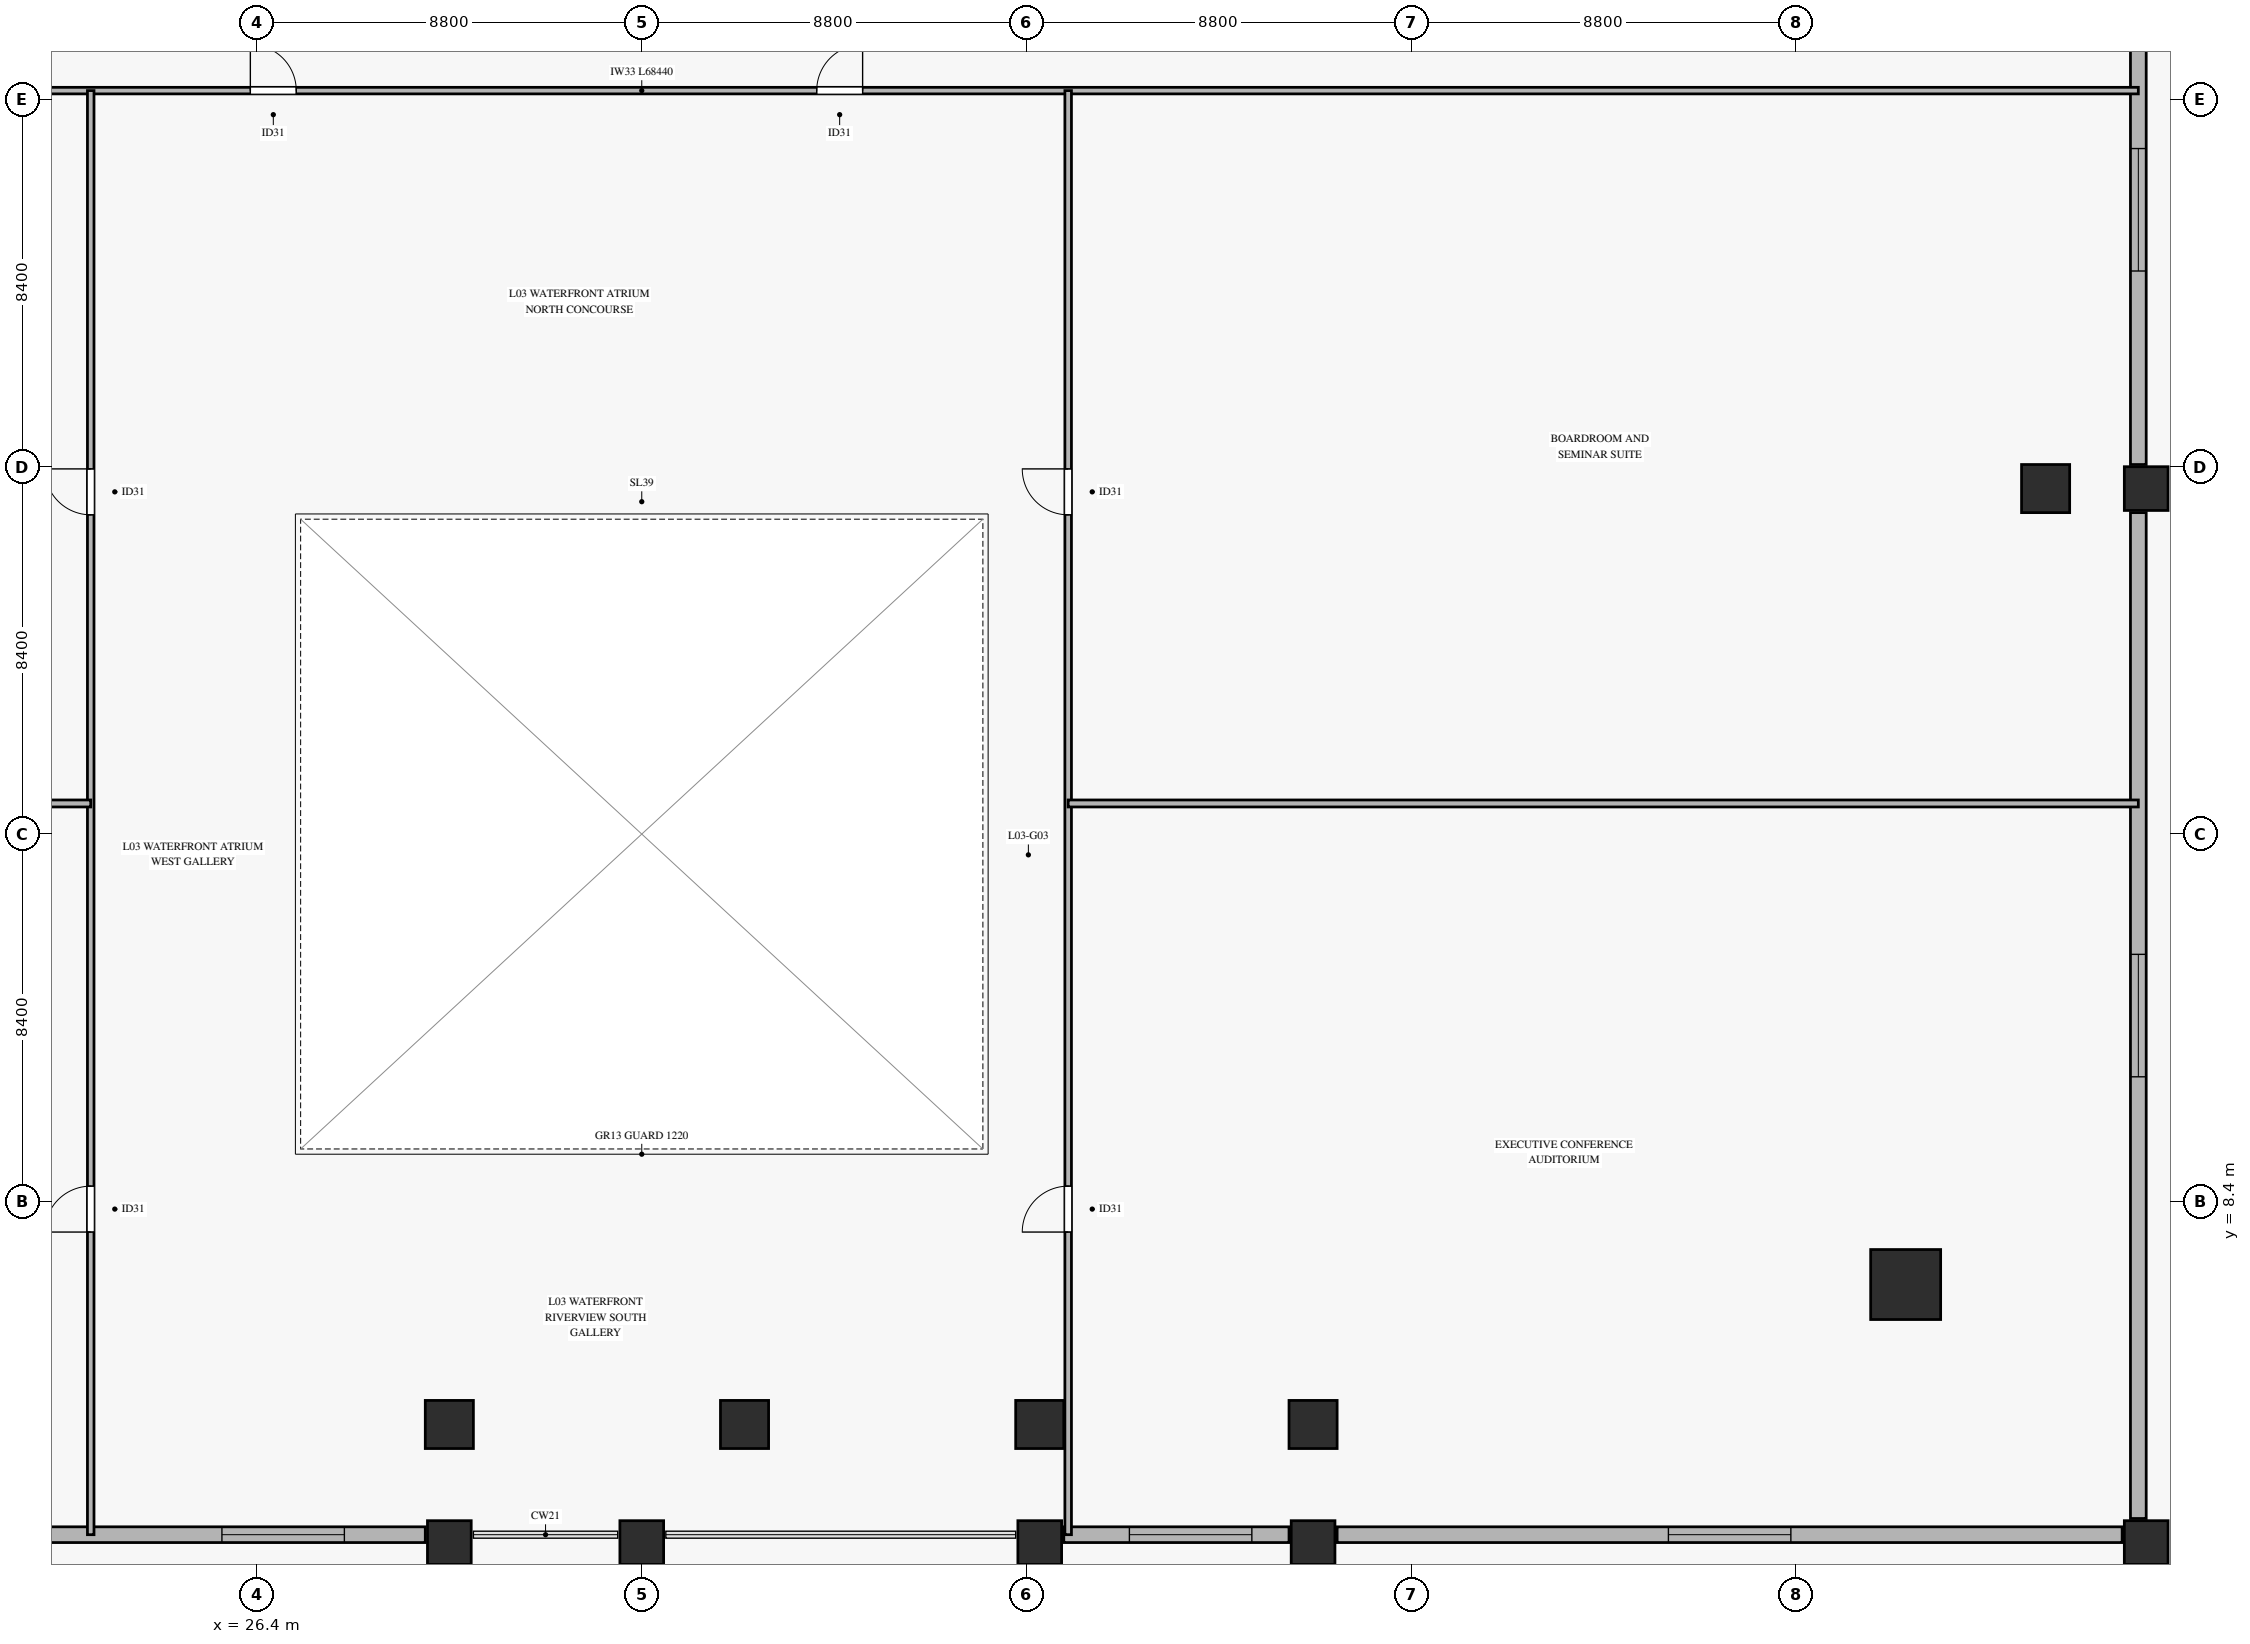
"""IFC4 building model, lengths in metres.
Left out: names, types, materials, properties, quantities, classifications, styles, units other than length and angle.
Written with IfcOpenShell. Run it as: python <this file> out.ifc"""

import sys

from ifc_helpers import new_model, si_unit, direction, frame, frame_2d, origin, origin_2d, place, context, subcontext, project, spatial, rectangle, hollow_rectangle, extrude, source, transform, mapped, element, fill, save


model = new_model("IFC4")
c1 = context("Model", 3, precision=1e-05, world=origin(), true_north=direction((0.0, 1.0)))
c2 = subcontext(c1, "Body", "Model", "MODEL_VIEW")
j1 = project(units=[si_unit("LENGTHUNIT", "METRE"), si_unit("PLANEANGLEUNIT", "RADIAN")], contexts=[c1])
p1 = place(None, origin())
s1 = spatial("IfcSite", under=j1, at=p1, CompositionType="ELEMENT")
p2 = place(p1, origin())
s2 = spatial("IfcBuilding", under=s1, at=p2, CompositionType="ELEMENT")
p3 = place(p2, frame((0.0, 0.0, 10.4)))
s3 = spatial("IfcBuildingStorey", under=s2, at=p3, CompositionType="ELEMENT", Elevation=10.4)
m1 = source(origin(), c2, "Body", "SweptSolid", [
    extrude(hollow_rectangle(XDim=1.6, YDim=1.6, WallThickness=0.075, at=origin_2d()), origin(), (0.0, 0.0, 1.0), 4.54),
])
p4 = place(p3, frame((64.1, 6.5, 0.0), z_axis=(0.0, 0.0, 1.0), x_axis=(1.0, 0.0, 0.0)))
e1 = element("IfcColumn", 1, at=p4, inside=s3, PredefinedType="COLUMN", context=c2, shape_type="MappedRepresentation", body=[
    mapped(m1, transform((0.0, 0.0, 0.0), x_axis=(1.0, 0.0, 0.0), y_axis=(0.0, 1.0, 0.0), z_axis=(0.0, 0.0, 1.0), scale=1.0)),
])
m2 = source(origin(), c2, "Body", "SweptSolid", [
    extrude(hollow_rectangle(XDim=1.1, YDim=1.1, WallThickness=0.05, at=origin_2d()), origin(), (0.0, 0.0, 1.0), 4.54),
])
for number, where, z_axis, x_axis in (
    (2, (30.8, 3.3, 0.0), (0.0, 0.0, 1.0), (1.0, 0.0, 0.0)),
    (3, (37.55, 3.3, 0.0), (0.0, 0.0, 1.0), (1.0, 0.0, 0.0)),
    (4, (44.3, 3.3, 0.0), (0.0, 0.0, 1.0), (1.0, 0.0, 0.0)),
    (5, (50.55, 3.3, 0.0), (0.0, 0.0, 1.0), (1.0, 0.0, 0.0)),
    (6, (67.3, 24.7, 0.0), (0.0, 0.0, 1.0), (1.0, 0.0, 0.0)),
):
    element("IfcColumn", number, at=place(p3, frame(where, z_axis=z_axis, x_axis=x_axis)), inside=s3, PredefinedType="COLUMN", context=c2, shape_type="MappedRepresentation", body=[
        mapped(m2, transform((0.0, 0.0, 0.0), x_axis=(1.0, 0.0, 0.0), y_axis=(0.0, 1.0, 0.0), z_axis=(0.0, 0.0, 1.0), scale=1.0)),
    ])
m3 = source(origin(), c2, "Body", "SweptSolid", [
    extrude(hollow_rectangle(XDim=1.0, YDim=1.0, WallThickness=0.045, at=origin_2d()), origin(), (0.0, 0.0, 1.0), 4.54),
])
for number, where, z_axis, x_axis in (
    (7, (30.8, 0.6, 0.0), (0.0, 0.0, 1.0), (1.0, 0.0, 0.0)),
    (8, (35.2, 0.6, 0.0), (0.0, 0.0, 1.0), (1.0, 0.0, 0.0)),
    (9, (44.3, 0.6, 0.0), (0.0, 0.0, 1.0), (1.0, 0.0, 0.0)),
    (10, (50.55, 0.6, 0.0), (0.0, 0.0, 1.0), (1.0, 0.0, 0.0)),
    (11, (69.6, 0.6, 0.0), (0.0, 0.0, 1.0), (1.0, 0.0, 0.0)),
    (12, (69.6, 24.7, 0.0), (0.0, 0.0, 1.0), (1.0, 0.0, 0.0)),
):
    element("IfcColumn", number, at=place(p3, frame(where, z_axis=z_axis, x_axis=x_axis)), inside=s3, PredefinedType="COLUMN", context=c2, shape_type="MappedRepresentation", body=[
        mapped(m3, transform((0.0, 0.0, 0.0), x_axis=(1.0, 0.0, 0.0), y_axis=(0.0, 1.0, 0.0), z_axis=(0.0, 0.0, 1.0), scale=1.0)),
    ])
p5 = place(p3, frame((20.4, 0.78, 0.0), z_axis=(0.0, 0.0, 1.0), x_axis=(1.0, 0.0, 0.0)))
e13 = element("IfcWall", 13, at=p5, inside=s3, PredefinedType="SOLIDWALL", context=c2, shape_type="SweptSolid", body=[
    extrude(rectangle(XDim=9.85, YDim=0.36, at=frame_2d((4.925, 0.0))), origin(), (0.0, 0.0, 1.0), 3.42),
])
p6 = place(p5, frame((5.2, 0.0, 0.72)))
e14 = element("IfcOpeningElement", 14, at=p6, cuts=e13, PredefinedType="OPENING", context=c2, shape_type="SweptSolid", body=[
    extrude(rectangle(XDim=2.8, YDim=2.0, at=frame_2d((1.4, 1.0))), frame((0.0, 0.19, 0.0), z_axis=(0.0, -1.0, 0.0), x_axis=(1.0, 0.0, 0.0)), (0.0, 0.0, 1.0), 0.38),
])
p7 = place(p3, frame((44.85, 0.78, 0.0), z_axis=(0.0, 0.0, 1.0), x_axis=(1.0, 0.0, 0.0)))
e15 = element("IfcWall", 15, at=p7, inside=s3, PredefinedType="SOLIDWALL", context=c2, shape_type="SweptSolid", body=[
    extrude(rectangle(XDim=5.15, YDim=0.36, at=frame_2d((2.575, 0.0))), origin(), (0.0, 0.0, 1.0), 3.42),
])
p8 = place(p7, frame((1.5, 0.0, 0.72)))
e16 = element("IfcOpeningElement", 16, at=p8, cuts=e15, PredefinedType="OPENING", context=c2, shape_type="SweptSolid", body=[
    extrude(rectangle(XDim=2.8, YDim=2.0, at=frame_2d((1.4, 1.0))), frame((0.0, 0.19, 0.0), z_axis=(0.0, -1.0, 0.0), x_axis=(1.0, 0.0, 0.0)), (0.0, 0.0, 1.0), 0.38),
])
p9 = place(p3, frame((51.1, 0.78, 0.0), z_axis=(0.0, 0.0, 1.0), x_axis=(1.0, 0.0, 0.0)))
e17 = element("IfcWall", 17, at=p9, inside=s3, PredefinedType="SOLIDWALL", context=c2, shape_type="SweptSolid", body=[
    extrude(rectangle(XDim=17.95, YDim=0.36, at=frame_2d((8.975, 0.0))), origin(), (0.0, 0.0, 1.0), 3.42),
])
p10 = place(p9, frame((7.575, 0.0, 0.72)))
e18 = element("IfcOpeningElement", 18, at=p10, cuts=e17, PredefinedType="OPENING", context=c2, shape_type="SweptSolid", body=[
    extrude(rectangle(XDim=2.8, YDim=2.0, at=frame_2d((1.4, 1.0))), frame((0.0, 0.19, 0.0), z_axis=(0.0, -1.0, 0.0), x_axis=(1.0, 0.0, 0.0)), (0.0, 0.0, 1.0), 0.38),
])
p11 = place(p3, frame((69.42, 1.15, 0.0), z_axis=(0.0, 0.0, 1.0), x_axis=(0.0, 1.0, 0.0)))
e19 = element("IfcWall", 19, at=p11, inside=s3, PredefinedType="SOLIDWALL", context=c2, shape_type="SweptSolid", body=[
    extrude(rectangle(XDim=23.0, YDim=0.36, at=frame_2d((11.5, 0.0))), origin(), (0.0, 0.0, 1.0), 3.42),
])
p12 = place(p11, frame((10.1, 0.0, 0.72)))
e20 = element("IfcOpeningElement", 20, at=p12, cuts=e19, PredefinedType="OPENING", context=c2, shape_type="SweptSolid", body=[
    extrude(rectangle(XDim=2.8, YDim=2.0, at=frame_2d((1.4, 1.0))), frame((0.0, 0.19, 0.0), z_axis=(0.0, -1.0, 0.0), x_axis=(1.0, 0.0, 0.0)), (0.0, 0.0, 1.0), 0.38),
])
p13 = place(p3, frame((69.42, 25.25, 0.0), z_axis=(0.0, 0.0, 1.0), x_axis=(0.0, 1.0, 0.0)))
e21 = element("IfcWall", 21, at=p13, inside=s3, PredefinedType="SOLIDWALL", context=c2, shape_type="SweptSolid", body=[
    extrude(rectangle(XDim=11.65, YDim=0.36, at=frame_2d((5.825, 0.0))), origin(), (0.0, 0.0, 1.0), 3.42),
])
p14 = place(p13, frame((4.425, 0.0, 0.72)))
e22 = element("IfcOpeningElement", 22, at=p14, cuts=e21, PredefinedType="OPENING", context=c2, shape_type="SweptSolid", body=[
    extrude(rectangle(XDim=2.8, YDim=2.0, at=frame_2d((1.4, 1.0))), frame((0.0, 0.19, 0.0), z_axis=(0.0, -1.0, 0.0), x_axis=(1.0, 0.0, 0.0)), (0.0, 0.0, 1.0), 0.38),
])
p15 = place(p3, frame((0.98, 33.8, 0.0), z_axis=(0.0, 0.0, 1.0), x_axis=(1.0, 0.0, 0.0)))
e23 = element("IfcWall", 23, at=p15, inside=s3, PredefinedType="PARTITIONING", context=c2, shape_type="SweptSolid", body=[
    extrude(rectangle(XDim=68.44, YDim=0.15, at=frame_2d((34.22, 0.0))), origin(), (0.0, 0.0, 1.0), 3.425),
])
p16 = place(p15, frame((25.27, 0.0, 0.0)))
e24 = element("IfcOpeningElement", 24, at=p16, cuts=e23, PredefinedType="OPENING", context=c2, shape_type="SweptSolid", body=[
    extrude(rectangle(XDim=1.05, YDim=2.15, at=frame_2d((0.525, 1.075))), frame((0.0, 0.085, 0.0), z_axis=(0.0, -1.0, 0.0), x_axis=(1.0, 0.0, 0.0)), (0.0, 0.0, 1.0), 0.17),
])
p17 = place(p15, frame((38.22, 0.0, 0.0)))
e25 = element("IfcOpeningElement", 25, at=p17, cuts=e23, PredefinedType="OPENING", context=c2, shape_type="SweptSolid", body=[
    extrude(rectangle(XDim=1.05, YDim=2.15, at=frame_2d((0.525, 1.075))), frame((0.0, 0.085, 0.0), z_axis=(0.0, -1.0, 0.0), x_axis=(1.0, 0.0, 0.0)), (0.0, 0.0, 1.0), 0.17),
])
p18 = place(p3, frame((22.6, 0.78, 0.0), z_axis=(0.0, 0.0, 1.0), x_axis=(0.0, 1.0, 0.0)))
e26 = element("IfcWall", 26, at=p18, inside=s3, PredefinedType="PARTITIONING", context=c2, shape_type="SweptSolid", body=[
    extrude(rectangle(XDim=33.02, YDim=0.15, at=frame_2d((16.51, 0.0))), origin(), (0.0, 0.0, 1.0), 3.425),
])
p19 = place(p18, frame((6.92, 0.0, 0.0)))
e27 = element("IfcOpeningElement", 27, at=p19, cuts=e26, PredefinedType="OPENING", context=c2, shape_type="SweptSolid", body=[
    extrude(rectangle(XDim=1.05, YDim=2.15, at=frame_2d((0.525, 1.075))), frame((0.0, 0.085, 0.0), z_axis=(0.0, -1.0, 0.0), x_axis=(1.0, 0.0, 0.0)), (0.0, 0.0, 1.0), 0.17),
])
p20 = place(p18, frame((23.32, 0.0, 0.0)))
e28 = element("IfcOpeningElement", 28, at=p20, cuts=e26, PredefinedType="OPENING", context=c2, shape_type="SweptSolid", body=[
    extrude(rectangle(XDim=1.05, YDim=2.15, at=frame_2d((0.525, 1.075))), frame((0.0, 0.085, 0.0), z_axis=(0.0, -1.0, 0.0), x_axis=(1.0, 0.0, 0.0)), (0.0, 0.0, 1.0), 0.17),
])
p21 = place(p3, frame((44.95, 0.78, 0.0), z_axis=(0.0, 0.0, 1.0), x_axis=(0.0, 1.0, 0.0)))
e29 = element("IfcWall", 29, at=p21, inside=s3, PredefinedType="PARTITIONING", context=c2, shape_type="SweptSolid", body=[
    extrude(rectangle(XDim=33.02, YDim=0.15, at=frame_2d((16.51, 0.0))), origin(), (0.0, 0.0, 1.0), 3.425),
])
p22 = place(p21, frame((6.92, 0.0, 0.0)))
e30 = element("IfcOpeningElement", 30, at=p22, cuts=e29, PredefinedType="OPENING", context=c2, shape_type="SweptSolid", body=[
    extrude(rectangle(XDim=1.05, YDim=2.15, at=frame_2d((0.525, 1.075))), frame((0.0, 0.085, 0.0), z_axis=(0.0, -1.0, 0.0), x_axis=(1.0, 0.0, 0.0)), (0.0, 0.0, 1.0), 0.17),
])
p23 = place(p21, frame((23.32, 0.0, 0.0)))
e31 = element("IfcOpeningElement", 31, at=p23, cuts=e29, PredefinedType="OPENING", context=c2, shape_type="SweptSolid", body=[
    extrude(rectangle(XDim=1.05, YDim=2.15, at=frame_2d((0.525, 1.075))), frame((0.0, 0.085, 0.0), z_axis=(0.0, -1.0, 0.0), x_axis=(1.0, 0.0, 0.0)), (0.0, 0.0, 1.0), 0.17),
])
p24 = place(p3, frame((0.98, 17.5, 0.0), z_axis=(0.0, 0.0, 1.0), x_axis=(1.0, 0.0, 0.0)))
e32 = element("IfcWall", 32, at=p24, inside=s3, PredefinedType="PARTITIONING", context=c2, shape_type="SweptSolid", body=[
    extrude(rectangle(XDim=21.62, YDim=0.16, at=frame_2d((10.81, 0.0))), origin(), (0.0, 0.0, 1.0), 3.425),
])
p25 = place(p3, frame((44.95, 17.5, 0.0), z_axis=(0.0, 0.0, 1.0), x_axis=(1.0, 0.0, 0.0)))
e33 = element("IfcWall", 33, at=p25, inside=s3, PredefinedType="PARTITIONING", context=c2, shape_type="SweptSolid", body=[
    extrude(rectangle(XDim=24.47, YDim=0.16, at=frame_2d((12.235, 0.0))), origin(), (0.0, 0.0, 1.0), 3.425),
])
m4 = source(origin(), c2, "Body", "SweptSolid", [
    extrude(rectangle(XDim=2.8, YDim=2.0, at=frame_2d((1.4, 1.0))), frame((0.0, 0.03, 0.0), z_axis=(0.0, -1.0, 0.0), x_axis=(1.0, 0.0, 0.0)), (0.0, 0.0, 1.0), 0.06),
])
p26 = place(p6, origin())
e34 = element("IfcWindow", 34, at=p26, inside=s3, PartitioningType="SINGLE_PANEL", PredefinedType="WINDOW", context=c2, shape_type="MappedRepresentation", body=[
    mapped(m4, transform((0.0, 0.0, 0.0), x_axis=(1.0, 0.0, 0.0), y_axis=(0.0, 1.0, 0.0), z_axis=(0.0, 0.0, 1.0), scale=1.0)),
])
fill(e14, e34)
p27 = place(p8, origin())
e35 = element("IfcWindow", 35, at=p27, inside=s3, PartitioningType="SINGLE_PANEL", PredefinedType="WINDOW", context=c2, shape_type="MappedRepresentation", body=[
    mapped(m4, transform((0.0, 0.0, 0.0), x_axis=(1.0, 0.0, 0.0), y_axis=(0.0, 1.0, 0.0), z_axis=(0.0, 0.0, 1.0), scale=1.0)),
])
fill(e16, e35)
p28 = place(p10, origin())
e36 = element("IfcWindow", 36, at=p28, inside=s3, PartitioningType="SINGLE_PANEL", PredefinedType="WINDOW", context=c2, shape_type="MappedRepresentation", body=[
    mapped(m4, transform((0.0, 0.0, 0.0), x_axis=(1.0, 0.0, 0.0), y_axis=(0.0, 1.0, 0.0), z_axis=(0.0, 0.0, 1.0), scale=1.0)),
])
fill(e18, e36)
p29 = place(p12, origin())
e37 = element("IfcWindow", 37, at=p29, inside=s3, PartitioningType="SINGLE_PANEL", PredefinedType="WINDOW", context=c2, shape_type="MappedRepresentation", body=[
    mapped(m4, transform((0.0, 0.0, 0.0), x_axis=(1.0, 0.0, 0.0), y_axis=(0.0, 1.0, 0.0), z_axis=(0.0, 0.0, 1.0), scale=1.0)),
])
fill(e20, e37)
p30 = place(p14, origin())
e38 = element("IfcWindow", 38, at=p30, inside=s3, PartitioningType="SINGLE_PANEL", PredefinedType="WINDOW", context=c2, shape_type="MappedRepresentation", body=[
    mapped(m4, transform((0.0, 0.0, 0.0), x_axis=(1.0, 0.0, 0.0), y_axis=(0.0, 1.0, 0.0), z_axis=(0.0, 0.0, 1.0), scale=1.0)),
])
fill(e22, e38)
m5 = source(origin(), c2, "Body", "SweptSolid", [
    extrude(rectangle(XDim=1.05, YDim=2.15, at=frame_2d((0.525, 1.075))), frame((0.0, 0.025, 0.0), z_axis=(0.0, -1.0, 0.0), x_axis=(1.0, 0.0, 0.0)), (0.0, 0.0, 1.0), 0.05),
])
p31 = place(p16, origin())
e39 = element("IfcDoor", 39, at=p31, inside=s3, OperationType="SINGLE_SWING_LEFT", PredefinedType="DOOR", context=c2, shape_type="MappedRepresentation", body=[
    mapped(m5, transform((0.0, 0.0, 0.0), x_axis=(1.0, 0.0, 0.0), y_axis=(0.0, 1.0, 0.0), z_axis=(0.0, 0.0, 1.0), scale=1.0)),
])
fill(e24, e39)
p32 = place(p17, origin())
e40 = element("IfcDoor", 40, at=p32, inside=s3, OperationType="SINGLE_SWING_RIGHT", PredefinedType="DOOR", context=c2, shape_type="MappedRepresentation", body=[
    mapped(m5, transform((0.0, 0.0, 0.0), x_axis=(1.0, 0.0, 0.0), y_axis=(0.0, 1.0, 0.0), z_axis=(0.0, 0.0, 1.0), scale=1.0)),
])
fill(e25, e40)
p33 = place(p19, origin())
e41 = element("IfcDoor", 41, at=p33, inside=s3, OperationType="SINGLE_SWING_LEFT", PredefinedType="DOOR", context=c2, shape_type="MappedRepresentation", body=[
    mapped(m5, transform((0.0, 0.0, 0.0), x_axis=(1.0, 0.0, 0.0), y_axis=(0.0, 1.0, 0.0), z_axis=(0.0, 0.0, 1.0), scale=1.0)),
])
fill(e27, e41)
p34 = place(p20, origin())
e42 = element("IfcDoor", 42, at=p34, inside=s3, OperationType="SINGLE_SWING_RIGHT", PredefinedType="DOOR", context=c2, shape_type="MappedRepresentation", body=[
    mapped(m5, transform((0.0, 0.0, 0.0), x_axis=(1.0, 0.0, 0.0), y_axis=(0.0, 1.0, 0.0), z_axis=(0.0, 0.0, 1.0), scale=1.0)),
])
fill(e28, e42)
p35 = place(p22, origin())
e43 = element("IfcDoor", 43, at=p35, inside=s3, OperationType="SINGLE_SWING_LEFT", PredefinedType="DOOR", context=c2, shape_type="MappedRepresentation", body=[
    mapped(m5, transform((0.0, 0.0, 0.0), x_axis=(1.0, 0.0, 0.0), y_axis=(0.0, 1.0, 0.0), z_axis=(0.0, 0.0, 1.0), scale=1.0)),
])
fill(e30, e43)
p36 = place(p23, origin())
e44 = element("IfcDoor", 44, at=p36, inside=s3, OperationType="SINGLE_SWING_RIGHT", PredefinedType="DOOR", context=c2, shape_type="MappedRepresentation", body=[
    mapped(m5, transform((0.0, 0.0, 0.0), x_axis=(1.0, 0.0, 0.0), y_axis=(0.0, 1.0, 0.0), z_axis=(0.0, 0.0, 1.0), scale=1.0)),
])
fill(e31, e44)
save(model, sys.argv[1])
